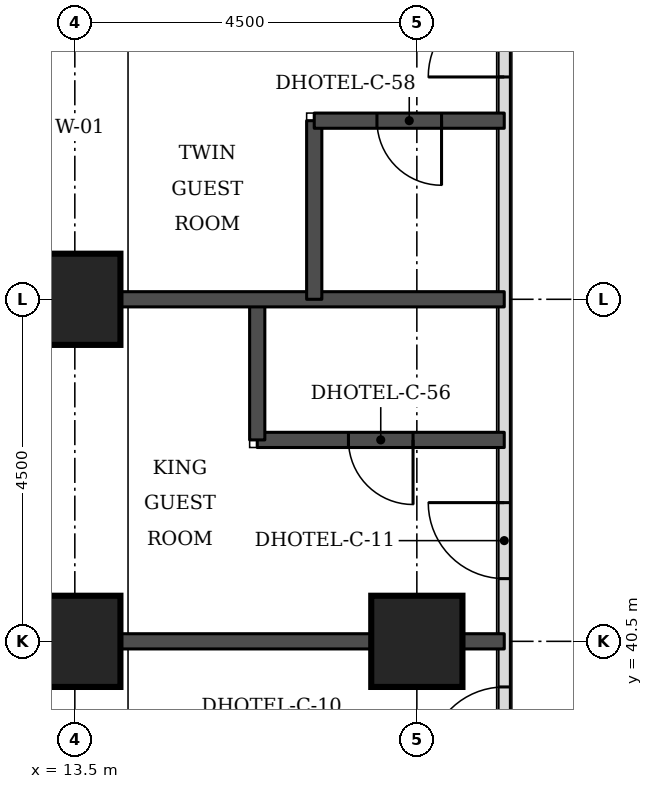
"""IFC4 building model, lengths in metres.
Left out: names, types, materials, properties, quantities, classifications, styles, units other than length and angle.
Written with IfcOpenShell. Run it as: python <this file> out.ifc"""

import sys

from ifc_helpers import new_model, si_unit, direction, frame, frame_2d, origin, origin_2d, place, context, subcontext, project, spatial, rectangle, extrude, element, fill, save


model = new_model("IFC4")
c1 = context("Model", 3, precision=1e-05, world=origin(), true_north=direction((0.0, 1.0)))
c2 = subcontext(c1, "Body", "Model", "MODEL_VIEW")
j1 = project(units=[si_unit("LENGTHUNIT", "METRE"), si_unit("PLANEANGLEUNIT", "RADIAN")], contexts=[c1])
p1 = place(None, origin())
s1 = spatial("IfcSite", under=j1, at=p1, CompositionType="ELEMENT")
p2 = place(p1, origin())
s2 = spatial("IfcBuilding", under=s1, at=p2, CompositionType="ELEMENT")
p3 = place(p2, frame((0.0, 0.0, 33.0)))
s3 = spatial("IfcBuildingStorey", under=s2, at=p3, CompositionType="ELEMENT", Elevation=33.0)
for number, where, z_axis, x_axis in (
    (1, (13.5, 40.5, 0.0), (0.0, 0.0, 1.0), (1.0, 0.0, 0.0)),
    (2, (18.0, 40.5, 0.0), (0.0, 0.0, 1.0), (1.0, 0.0, 0.0)),
    (3, (13.5, 45.0, 0.0), (0.0, 0.0, 1.0), (1.0, 0.0, 0.0)),
):
    element("IfcColumn", number, at=place(p3, frame(where, z_axis=z_axis, x_axis=x_axis)), inside=s3, PredefinedType="COLUMN", context=c2, shape_type="SweptSolid", body=[
        extrude(rectangle(XDim=1.2, YDim=1.2, at=origin_2d()), origin(), (0.0, 0.0, 1.0), 3.3),
    ])
p4 = place(p3, frame((19.15, 25.15, 0.0), z_axis=(0.0, 0.0, 1.0), x_axis=(0.0, 1.0, 0.0)))
e4 = element("IfcWall", 4, at=p4, inside=s3, PredefinedType="PARTITIONING", context=c2, shape_type="SweptSolid", body=[
    extrude(rectangle(XDim=24.35, YDim=0.15, at=frame_2d((12.175, 0.0))), origin(), (0.0, 0.0, 1.0), 3.08),
])
p5 = place(p4, frame((0.347, 0.0, 0.0)))
e5 = element("IfcOpeningElement", 5, at=p5, cuts=e4, PredefinedType="OPENING", context=c2, shape_type="SweptSolid", body=[
    extrude(rectangle(XDim=1.0, YDim=2.1, at=frame_2d((0.5, 1.05))), frame((0.0, 0.085, 0.0), z_axis=(0.0, -1.0, 0.0), x_axis=(1.0, 0.0, 0.0)), (0.0, 0.0, 1.0), 0.17),
])
p6 = place(p4, frame((4.775, 0.0, 0.0)))
e6 = element("IfcOpeningElement", 6, at=p6, cuts=e4, PredefinedType="OPENING", context=c2, shape_type="SweptSolid", body=[
    extrude(rectangle(XDim=1.0, YDim=2.1, at=frame_2d((0.5, 1.05))), frame((0.0, 0.085, 0.0), z_axis=(0.0, -1.0, 0.0), x_axis=(1.0, 0.0, 0.0)), (0.0, 0.0, 1.0), 0.17),
])
p7 = place(p4, frame((7.175, 0.0, 0.0)))
e7 = element("IfcOpeningElement", 7, at=p7, cuts=e4, PredefinedType="OPENING", context=c2, shape_type="SweptSolid", body=[
    extrude(rectangle(XDim=1.0, YDim=2.1, at=frame_2d((0.5, 1.05))), frame((0.0, 0.085, 0.0), z_axis=(0.0, -1.0, 0.0), x_axis=(1.0, 0.0, 0.0)), (0.0, 0.0, 1.0), 0.17),
])
p8 = place(p4, frame((13.75, 0.0, 0.0)))
e8 = element("IfcOpeningElement", 8, at=p8, cuts=e4, PredefinedType="OPENING", context=c2, shape_type="SweptSolid", body=[
    extrude(rectangle(XDim=1.0, YDim=2.1, at=frame_2d((0.5, 1.05))), frame((0.0, 0.085, 0.0), z_axis=(0.0, -1.0, 0.0), x_axis=(1.0, 0.0, 0.0)), (0.0, 0.0, 1.0), 0.17),
])
p9 = place(p4, frame((16.175, 0.0, 0.0)))
e9 = element("IfcOpeningElement", 9, at=p9, cuts=e4, PredefinedType="OPENING", context=c2, shape_type="SweptSolid", body=[
    extrude(rectangle(XDim=1.0, YDim=2.1, at=frame_2d((0.5, 1.05))), frame((0.0, 0.085, 0.0), z_axis=(0.0, -1.0, 0.0), x_axis=(1.0, 0.0, 0.0)), (0.0, 0.0, 1.0), 0.17),
])
p10 = place(p4, frame((22.775, 0.0, 0.0)))
e10 = element("IfcOpeningElement", 10, at=p10, cuts=e4, PredefinedType="OPENING", context=c2, shape_type="SweptSolid", body=[
    extrude(rectangle(XDim=1.0, YDim=2.1, at=frame_2d((0.5, 1.05))), frame((0.0, 0.085, 0.0), z_axis=(0.0, -1.0, 0.0), x_axis=(1.0, 0.0, 0.0)), (0.0, 0.0, 1.0), 0.17),
])
p11 = place(p3, frame((14.1, 40.5, 0.0), z_axis=(0.0, 0.0, 1.0), x_axis=(1.0, 0.0, 0.0)))
e11 = element("IfcWall", 11, at=p11, inside=s3, PredefinedType="SOLIDWALL", context=c2, shape_type="SweptSolid", body=[
    extrude(rectangle(XDim=5.05, YDim=0.2, at=frame_2d((2.525, 0.0))), origin(), (0.0, 0.0, 1.0), 3.08),
])
p12 = place(p3, frame((15.9, 43.15, 0.0), z_axis=(0.0, 0.0, 1.0), x_axis=(1.0, 0.0, 0.0)))
e12 = element("IfcWall", 12, at=p12, inside=s3, PredefinedType="SOLIDWALL", context=c2, shape_type="SweptSolid", body=[
    extrude(rectangle(XDim=3.25, YDim=0.2, at=frame_2d((1.625, 0.0))), origin(), (0.0, 0.0, 1.0), 3.08),
])
p13 = place(p12, frame((1.2, 0.0, 0.0)))
e13 = element("IfcOpeningElement", 13, at=p13, cuts=e12, PredefinedType="OPENING", context=c2, shape_type="SweptSolid", body=[
    extrude(rectangle(XDim=0.85, YDim=2.1, at=frame_2d((0.425, 1.05))), frame((0.0, 0.11, 0.0), z_axis=(0.0, -1.0, 0.0), x_axis=(1.0, 0.0, 0.0)), (0.0, 0.0, 1.0), 0.22),
])
p14 = place(p3, frame((15.9, 43.15, 0.0), z_axis=(0.0, 0.0, 1.0), x_axis=(0.0, 1.0, 0.0)))
e14 = element("IfcWall", 14, at=p14, inside=s3, PredefinedType="SOLIDWALL", context=c2, shape_type="SweptSolid", body=[
    extrude(rectangle(XDim=1.85, YDim=0.2, at=frame_2d((0.925, 0.0))), origin(), (0.0, 0.0, 1.0), 3.08),
])
p15 = place(p3, frame((14.1, 45.0, 0.0), z_axis=(0.0, 0.0, 1.0), x_axis=(1.0, 0.0, 0.0)))
e15 = element("IfcWall", 15, at=p15, inside=s3, PredefinedType="SOLIDWALL", context=c2, shape_type="SweptSolid", body=[
    extrude(rectangle(XDim=5.05, YDim=0.2, at=frame_2d((2.525, 0.0))), origin(), (0.0, 0.0, 1.0), 3.08),
])
p16 = place(p3, frame((16.65, 45.0, 0.0), z_axis=(0.0, 0.0, 1.0), x_axis=(0.0, 1.0, 0.0)))
e16 = element("IfcWall", 16, at=p16, inside=s3, PredefinedType="SOLIDWALL", context=c2, shape_type="SweptSolid", body=[
    extrude(rectangle(XDim=2.35, YDim=0.2, at=frame_2d((1.175, 0.0))), origin(), (0.0, 0.0, 1.0), 3.08),
])
p17 = place(p3, frame((16.65, 47.35, 0.0), z_axis=(0.0, 0.0, 1.0), x_axis=(1.0, 0.0, 0.0)))
e17 = element("IfcWall", 17, at=p17, inside=s3, PredefinedType="SOLIDWALL", context=c2, shape_type="SweptSolid", body=[
    extrude(rectangle(XDim=2.5, YDim=0.2, at=frame_2d((1.25, 0.0))), origin(), (0.0, 0.0, 1.0), 3.08),
])
p18 = place(p17, frame((0.825, 0.0, 0.0)))
e18 = element("IfcOpeningElement", 18, at=p18, cuts=e17, PredefinedType="OPENING", context=c2, shape_type="SweptSolid", body=[
    extrude(rectangle(XDim=0.85, YDim=2.1, at=frame_2d((0.425, 1.05))), frame((0.0, 0.11, 0.0), z_axis=(0.0, -1.0, 0.0), x_axis=(1.0, 0.0, 0.0)), (0.0, 0.0, 1.0), 0.22),
])
p19 = place(p8, origin())
e19 = element("IfcDoor", 19, at=p19, inside=s3, OperationType="SINGLE_SWING_LEFT", PredefinedType="DOOR", context=c2, shape_type="SweptSolid", body=[
    extrude(rectangle(XDim=1.0, YDim=2.1, at=frame_2d((0.5, 1.05))), frame((0.0, 0.025, 0.0), z_axis=(0.0, -1.0, 0.0), x_axis=(1.0, 0.0, 0.0)), (0.0, 0.0, 1.0), 0.05),
])
fill(e8, e19)
p20 = place(p9, origin())
e20 = element("IfcDoor", 20, at=p20, inside=s3, OperationType="SINGLE_SWING_RIGHT", PredefinedType="DOOR", context=c2, shape_type="SweptSolid", body=[
    extrude(rectangle(XDim=1.0, YDim=2.1, at=frame_2d((0.5, 1.05))), frame((0.0, 0.025, 0.0), z_axis=(0.0, -1.0, 0.0), x_axis=(1.0, 0.0, 0.0)), (0.0, 0.0, 1.0), 0.05),
])
fill(e9, e20)
p21 = place(p13, frame((0.85, 0.0, 0.0), z_axis=(0.0, 0.0, 1.0), x_axis=(-1.0, 0.0, 0.0)))
e21 = element("IfcDoor", 21, at=p21, inside=s3, OperationType="SINGLE_SWING_LEFT", PredefinedType="DOOR", context=c2, shape_type="SweptSolid", body=[
    extrude(rectangle(XDim=0.85, YDim=2.1, at=frame_2d((0.425, 1.05))), frame((0.0, 0.025, 0.0), z_axis=(0.0, -1.0, 0.0), x_axis=(1.0, 0.0, 0.0)), (0.0, 0.0, 1.0), 0.05),
])
fill(e13, e21)
p22 = place(p10, origin())
e22 = element("IfcDoor", 22, at=p22, inside=s3, OperationType="SINGLE_SWING_LEFT", PredefinedType="DOOR", context=c2, shape_type="SweptSolid", body=[
    extrude(rectangle(XDim=1.0, YDim=2.1, at=frame_2d((0.5, 1.05))), frame((0.0, 0.025, 0.0), z_axis=(0.0, -1.0, 0.0), x_axis=(1.0, 0.0, 0.0)), (0.0, 0.0, 1.0), 0.05),
])
fill(e10, e22)
p23 = place(p18, frame((0.85, 0.0, 0.0), z_axis=(0.0, 0.0, 1.0), x_axis=(-1.0, 0.0, 0.0)))
e23 = element("IfcDoor", 23, at=p23, inside=s3, OperationType="SINGLE_SWING_LEFT", PredefinedType="DOOR", context=c2, shape_type="SweptSolid", body=[
    extrude(rectangle(XDim=0.85, YDim=2.1, at=frame_2d((0.425, 1.05))), frame((0.0, 0.025, 0.0), z_axis=(0.0, -1.0, 0.0), x_axis=(1.0, 0.0, 0.0)), (0.0, 0.0, 1.0), 0.05),
])
fill(e18, e23)
save(model, sys.argv[1])
